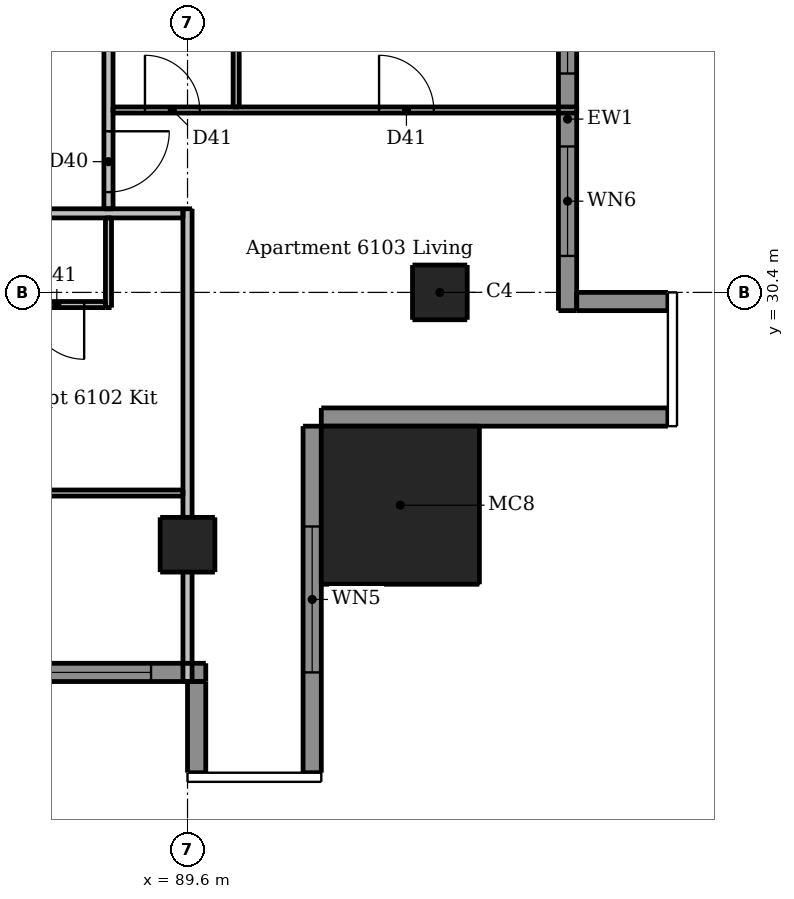
"""IFC4 building model, lengths in metres.
Left out: names, types, materials, properties, quantities, classifications, styles, units other than length and angle.
Written with IfcOpenShell. Run it as: python <this file> out.ifc"""

import sys

from ifc_helpers import new_model, si_unit, direction, frame, frame_2d, origin, origin_2d, place, context, subcontext, project, spatial, rectangle, extrude, element, fill, save


model = new_model("IFC4")
c1 = context("Model", 3, precision=1e-05, world=origin(), true_north=direction((0.0, 1.0)))
c2 = subcontext(c1, "Body", "Model", "MODEL_VIEW")
j1 = project(units=[si_unit("LENGTHUNIT", "METRE"), si_unit("PLANEANGLEUNIT", "RADIAN")], contexts=[c1])
p1 = place(None, origin())
s1 = spatial("IfcSite", under=j1, at=p1, CompositionType="ELEMENT")
p2 = place(p1, origin())
s2 = spatial("IfcBuilding", under=s1, at=p2, CompositionType="ELEMENT")
p3 = place(p2, frame((0.0, 0.0, 226.6)))
s3 = spatial("IfcBuildingStorey", under=s2, at=p3, CompositionType="ELEMENT", Elevation=226.6)
for number, where, z_axis, x_axis in (
    (1, (89.6, 26.25, 0.0), (0.0, 0.0, 1.0), (1.0, 0.0, 0.0)),
    (2, (93.75, 30.4, 0.0), (0.0, 0.0, 1.0), (1.0, 0.0, 0.0)),
):
    element("IfcColumn", number, at=place(p3, frame(where, z_axis=z_axis, x_axis=x_axis)), inside=s3, PredefinedType="COLUMN", context=c2, shape_type="SweptSolid", body=[
        extrude(rectangle(XDim=0.9, YDim=0.9, at=origin_2d()), origin(), (0.0, 0.0, 1.0), 2.95),
    ])
p4 = place(p3, frame((93.1, 26.9, 0.0), z_axis=(0.0, 0.0, 1.0), x_axis=(1.0, 0.0, 0.0)))
e3 = element("IfcColumn", 3, at=p4, inside=s3, PredefinedType="COLUMN", context=c2, shape_type="SweptSolid", body=[
    extrude(rectangle(XDim=2.6, YDim=2.6, at=origin_2d()), origin(), (0.0, 0.0, 1.0), 3.3),
])
p5 = place(p3, frame((89.75, 24.0, 0.0), z_axis=(0.0, 0.0, 1.0), x_axis=(0.0, -1.0, 0.0)))
e4 = element("IfcWall", 4, at=p5, inside=s3, PredefinedType="SOLIDWALL", context=c2, shape_type="SweptSolid", body=[
    extrude(rectangle(XDim=1.5, YDim=0.3, at=frame_2d((0.75, 0.0))), origin(), (0.0, 0.0, 1.0), 2.95),
])
p6 = place(p3, frame((91.65, 22.5, 0.0), z_axis=(0.0, 0.0, 1.0), x_axis=(0.0, 1.0, 0.0)))
e5 = element("IfcWall", 5, at=p6, inside=s3, PredefinedType="SOLIDWALL", context=c2, shape_type="SweptSolid", body=[
    extrude(rectangle(XDim=5.7, YDim=0.3, at=frame_2d((2.85, 0.0))), origin(), (0.0, 0.0, 1.0), 2.95),
])
p7 = place(p6, frame((1.65, 0.0, 0.15)))
e6 = element("IfcOpeningElement", 6, at=p7, cuts=e5, PredefinedType="OPENING", context=c2, shape_type="SweptSolid", body=[
    extrude(rectangle(XDim=2.4, YDim=2.1, at=frame_2d((1.2, 1.05))), frame((0.0, 0.16, 0.0), z_axis=(0.0, -1.0, 0.0), x_axis=(1.0, 0.0, 0.0)), (0.0, 0.0, 1.0), 0.32),
])
p8 = place(p3, frame((91.8, 28.35, 0.0), z_axis=(0.0, 0.0, 1.0), x_axis=(1.0, 0.0, 0.0)))
e7 = element("IfcWall", 7, at=p8, inside=s3, PredefinedType="SOLIDWALL", context=c2, shape_type="SweptSolid", body=[
    extrude(rectangle(XDim=5.7, YDim=0.3, at=frame_2d((2.85, 0.0))), origin(), (0.0, 0.0, 1.0), 2.95),
])
p9 = place(p3, frame((97.5, 30.25, 0.0), z_axis=(0.0, 0.0, 1.0), x_axis=(-1.0, 0.0, 0.0)))
e8 = element("IfcWall", 8, at=p9, inside=s3, PredefinedType="SOLIDWALL", context=c2, shape_type="SweptSolid", body=[
    extrude(rectangle(XDim=1.5, YDim=0.3, at=frame_2d((0.75, 0.0))), origin(), (0.0, 0.0, 1.0), 2.95),
])
p10 = place(p3, frame((83.6, 24.15, 0.0), z_axis=(0.0, 0.0, 1.0), x_axis=(1.0, 0.0, 0.0)))
e9 = element("IfcWall", 9, at=p10, inside=s3, PredefinedType="SOLIDWALL", context=c2, shape_type="SweptSolid", body=[
    extrude(rectangle(XDim=6.3, YDim=0.3, at=frame_2d((3.15, 0.0))), origin(), (0.0, 0.0, 1.0), 2.34),
])
p11 = place(p10, frame((0.6, 0.0, 0.15)))
e10 = element("IfcOpeningElement", 10, at=p11, cuts=e9, PredefinedType="OPENING", context=c2, shape_type="SweptSolid", body=[
    extrude(rectangle(XDim=1.8, YDim=2.1, at=frame_2d((0.9, 1.05))), frame((0.0, 0.16, 0.0), z_axis=(0.0, -1.0, 0.0), x_axis=(1.0, 0.0, 0.0)), (0.0, 0.0, 1.0), 0.32),
])
p12 = place(p10, frame((3.6, 0.0, 0.15)))
e11 = element("IfcOpeningElement", 11, at=p12, cuts=e9, PredefinedType="OPENING", context=c2, shape_type="SweptSolid", body=[
    extrude(rectangle(XDim=1.8, YDim=2.1, at=frame_2d((0.9, 1.05))), frame((0.0, 0.16, 0.0), z_axis=(0.0, -1.0, 0.0), x_axis=(1.0, 0.0, 0.0)), (0.0, 0.0, 1.0), 0.32),
])
p13 = place(p3, frame((95.85, 30.1, 0.0), z_axis=(0.0, 0.0, 1.0), x_axis=(0.0, 1.0, 0.0)))
e12 = element("IfcWall", 12, at=p13, inside=s3, PredefinedType="SOLIDWALL", context=c2, shape_type="SweptSolid", body=[
    extrude(rectangle(XDim=6.3, YDim=0.3, at=frame_2d((3.15, 0.0))), origin(), (0.0, 0.0, 1.0), 2.34),
])
p14 = place(p13, frame((0.9, 0.0, 0.15)))
e13 = element("IfcOpeningElement", 13, at=p14, cuts=e12, PredefinedType="OPENING", context=c2, shape_type="SweptSolid", body=[
    extrude(rectangle(XDim=1.8, YDim=2.1, at=frame_2d((0.9, 1.05))), frame((0.0, 0.16, 0.0), z_axis=(0.0, -1.0, 0.0), x_axis=(1.0, 0.0, 0.0)), (0.0, 0.0, 1.0), 0.32),
])
p15 = place(p13, frame((3.9, 0.0, 0.15)))
e14 = element("IfcOpeningElement", 14, at=p15, cuts=e12, PredefinedType="OPENING", context=c2, shape_type="SweptSolid", body=[
    extrude(rectangle(XDim=1.8, YDim=2.1, at=frame_2d((0.9, 1.05))), frame((0.0, 0.16, 0.0), z_axis=(0.0, -1.0, 0.0), x_axis=(1.0, 0.0, 0.0)), (0.0, 0.0, 1.0), 0.32),
])
p16 = place(p3, frame((88.3, 30.15, 0.0), z_axis=(0.0, 0.0, 1.0), x_axis=(0.0, 1.0, 0.0)))
e15 = element("IfcWall", 15, at=p16, inside=s3, PredefinedType="PARTITIONING", context=c2, shape_type="SweptSolid", body=[
    extrude(rectangle(XDim=1.475, YDim=0.1, at=frame_2d((0.738, 0.0))), origin(), (0.0, 0.0, 1.0), 2.95),
])
p17 = place(p3, frame((90.4, 33.45, 0.0), z_axis=(0.0, 0.0, 1.0), x_axis=(0.0, 1.0, 0.0)))
e16 = element("IfcWall", 16, at=p17, inside=s3, PredefinedType="PARTITIONING", context=c2, shape_type="SweptSolid", body=[
    extrude(rectangle(XDim=5.875, YDim=0.1, at=frame_2d((2.938, 0.0))), origin(), (0.0, 0.0, 1.0), 2.95),
])
p18 = place(p17, frame((3.75, 0.0, 0.0)))
e17 = element("IfcOpeningElement", 17, at=p18, cuts=e16, PredefinedType="OPENING", context=c2, shape_type="SweptSolid", body=[
    extrude(rectangle(XDim=0.8, YDim=2.1, at=frame_2d((0.4, 1.05))), frame((0.0, 0.06, 0.0), z_axis=(0.0, -1.0, 0.0), x_axis=(1.0, 0.0, 0.0)), (0.0, 0.0, 1.0), 0.12),
])
p19 = place(p3, frame((88.375, 33.4, 0.0), z_axis=(0.0, 0.0, 1.0), x_axis=(1.0, 0.0, 0.0)))
e18 = element("IfcWall", 18, at=p19, inside=s3, PredefinedType="PARTITIONING", context=c2, shape_type="SweptSolid", body=[
    extrude(rectangle(XDim=7.625, YDim=0.1, at=frame_2d((3.812, 0.0))), origin(), (0.0, 0.0, 1.0), 2.95),
])
p20 = place(p19, frame((0.525, 0.0, 0.0)))
e19 = element("IfcOpeningElement", 19, at=p20, cuts=e18, PredefinedType="OPENING", context=c2, shape_type="SweptSolid", body=[
    extrude(rectangle(XDim=0.9, YDim=2.1, at=frame_2d((0.45, 1.05))), frame((0.0, 0.06, 0.0), z_axis=(0.0, -1.0, 0.0), x_axis=(1.0, 0.0, 0.0)), (0.0, 0.0, 1.0), 0.12),
])
p21 = place(p19, frame((4.375, 0.0, 0.0)))
e20 = element("IfcOpeningElement", 20, at=p21, cuts=e18, PredefinedType="OPENING", context=c2, shape_type="SweptSolid", body=[
    extrude(rectangle(XDim=0.9, YDim=2.1, at=frame_2d((0.45, 1.05))), frame((0.0, 0.06, 0.0), z_axis=(0.0, -1.0, 0.0), x_axis=(1.0, 0.0, 0.0)), (0.0, 0.0, 1.0), 0.12),
])
p22 = place(p3, frame((88.25, 30.2, 0.0), z_axis=(0.0, 0.0, 1.0), x_axis=(-1.0, 0.0, 0.0)))
e21 = element("IfcWall", 21, at=p22, inside=s3, PredefinedType="PARTITIONING", context=c2, shape_type="SweptSolid", body=[
    extrude(rectangle(XDim=16.575, YDim=0.1, at=frame_2d((8.288, 0.0))), origin(), (0.0, 0.0, 1.0), 2.95),
])
p23 = place(p22, frame((5.7, 0.0, 0.0)))
e22 = element("IfcOpeningElement", 22, at=p23, cuts=e21, PredefinedType="OPENING", context=c2, shape_type="SweptSolid", body=[
    extrude(rectangle(XDim=0.9, YDim=2.1, at=frame_2d((0.45, 1.05))), frame((0.0, 0.06, 0.0), z_axis=(0.0, -1.0, 0.0), x_axis=(1.0, 0.0, 0.0)), (0.0, 0.0, 1.0), 0.12),
])
p24 = place(p22, frame((0.35, 0.0, 0.0)))
e23 = element("IfcOpeningElement", 23, at=p24, cuts=e21, PredefinedType="OPENING", context=c2, shape_type="SweptSolid", body=[
    extrude(rectangle(XDim=0.9, YDim=2.1, at=frame_2d((0.45, 1.05))), frame((0.0, 0.06, 0.0), z_axis=(0.0, -1.0, 0.0), x_axis=(1.0, 0.0, 0.0)), (0.0, 0.0, 1.0), 0.12),
])
p25 = place(p22, frame((2.1, 0.0, 0.0)))
e24 = element("IfcOpeningElement", 24, at=p25, cuts=e21, PredefinedType="OPENING", context=c2, shape_type="SweptSolid", body=[
    extrude(rectangle(XDim=0.9, YDim=2.1, at=frame_2d((0.45, 1.05))), frame((0.0, 0.06, 0.0), z_axis=(0.0, -1.0, 0.0), x_axis=(1.0, 0.0, 0.0)), (0.0, 0.0, 1.0), 0.12),
])
p26 = place(p22, frame((9.35, 0.0, 0.0)))
e25 = element("IfcOpeningElement", 25, at=p26, cuts=e21, PredefinedType="OPENING", context=c2, shape_type="SweptSolid", body=[
    extrude(rectangle(XDim=0.8, YDim=2.1, at=frame_2d((0.4, 1.05))), frame((0.0, 0.06, 0.0), z_axis=(0.0, -1.0, 0.0), x_axis=(1.0, 0.0, 0.0)), (0.0, 0.0, 1.0), 0.12),
])
p27 = place(p22, frame((14.4, 0.0, 0.0)))
e26 = element("IfcOpeningElement", 26, at=p27, cuts=e21, PredefinedType="OPENING", context=c2, shape_type="SweptSolid", body=[
    extrude(rectangle(XDim=0.9, YDim=2.1, at=frame_2d((0.45, 1.05))), frame((0.0, 0.06, 0.0), z_axis=(0.0, -1.0, 0.0), x_axis=(1.0, 0.0, 0.0)), (0.0, 0.0, 1.0), 0.12),
])
p28 = place(p22, frame((11.45, 0.0, 0.0)))
e27 = element("IfcOpeningElement", 27, at=p28, cuts=e21, PredefinedType="OPENING", context=c2, shape_type="SweptSolid", body=[
    extrude(rectangle(XDim=0.8, YDim=2.1, at=frame_2d((0.4, 1.05))), frame((0.0, 0.06, 0.0), z_axis=(0.0, -1.0, 0.0), x_axis=(1.0, 0.0, 0.0)), (0.0, 0.0, 1.0), 0.12),
])
p29 = place(p3, frame((84.85, 27.1, 0.0), z_axis=(0.0, 0.0, 1.0), x_axis=(1.0, 0.0, 0.0)))
e28 = element("IfcWall", 28, at=p29, inside=s3, PredefinedType="PARTITIONING", context=c2, shape_type="SweptSolid", body=[
    extrude(rectangle(XDim=4.675, YDim=0.1, at=frame_2d((2.337, 0.0))), origin(), (0.0, 0.0, 1.0), 2.95),
])
p30 = place(p3, frame((88.3, 61.175, 0.0), z_axis=(0.0, 0.0, 1.0), x_axis=(0.0, -1.0, 0.0)))
e29 = element("IfcWall", 29, at=p30, inside=s3, PredefinedType="PARTITIONING", context=c2, shape_type="SweptSolid", body=[
    extrude(rectangle(XDim=29.4, YDim=0.15, at=frame_2d((14.7, 0.0))), origin(), (0.0, 0.0, 1.0), 2.95),
])
p31 = place(p30, frame((28.125, 0.0, 0.0)))
e30 = element("IfcOpeningElement", 30, at=p31, cuts=e29, PredefinedType="OPENING", context=c2, shape_type="SweptSolid", body=[
    extrude(rectangle(XDim=1.0, YDim=2.1, at=frame_2d((0.5, 1.05))), frame((0.0, 0.085, 0.0), z_axis=(0.0, -1.0, 0.0), x_axis=(1.0, 0.0, 0.0)), (0.0, 0.0, 1.0), 0.17),
])
p32 = place(p30, frame((10.775, 0.0, 0.0)))
e31 = element("IfcOpeningElement", 31, at=p32, cuts=e29, PredefinedType="OPENING", context=c2, shape_type="SweptSolid", body=[
    extrude(rectangle(XDim=1.0, YDim=2.1, at=frame_2d((0.5, 1.05))), frame((0.0, 0.085, 0.0), z_axis=(0.0, -1.0, 0.0), x_axis=(1.0, 0.0, 0.0)), (0.0, 0.0, 1.0), 0.17),
])
p33 = place(p3, frame((89.6, 24.0, 0.0), z_axis=(0.0, 0.0, 1.0), x_axis=(0.0, 1.0, 0.0)))
e32 = element("IfcWall", 32, at=p33, inside=s3, PredefinedType="PARTITIONING", context=c2, shape_type="SweptSolid", body=[
    extrude(rectangle(XDim=7.775, YDim=0.15, at=frame_2d((3.887, 0.0))), origin(), (0.0, 0.0, 1.0), 2.332),
])
p34 = place(p3, frame((89.525, 31.7, 0.0), z_axis=(0.0, 0.0, 1.0), x_axis=(-1.0, 0.0, 0.0)))
e33 = element("IfcWall", 33, at=p34, inside=s3, PredefinedType="PARTITIONING", context=c2, shape_type="SweptSolid", body=[
    extrude(rectangle(XDim=30.55, YDim=0.15, at=frame_2d((15.275, 0.0))), origin(), (0.0, 0.0, 1.0), 2.95),
])
p35 = place(p34, frame((26.775, 0.0, 0.0)))
e34 = element("IfcOpeningElement", 34, at=p35, cuts=e33, PredefinedType="OPENING", context=c2, shape_type="SweptSolid", body=[
    extrude(rectangle(XDim=1.0, YDim=2.1, at=frame_2d((0.5, 1.05))), frame((0.0, 0.085, 0.0), z_axis=(0.0, -1.0, 0.0), x_axis=(1.0, 0.0, 0.0)), (0.0, 0.0, 1.0), 0.17),
])
p36 = place(p34, frame((9.075, 0.0, 0.0)))
e35 = element("IfcOpeningElement", 35, at=p36, cuts=e33, PredefinedType="OPENING", context=c2, shape_type="SweptSolid", body=[
    extrude(rectangle(XDim=1.0, YDim=2.1, at=frame_2d((0.5, 1.05))), frame((0.0, 0.085, 0.0), z_axis=(0.0, -1.0, 0.0), x_axis=(1.0, 0.0, 0.0)), (0.0, 0.0, 1.0), 0.17),
])
p37 = place(p7, origin())
e36 = element("IfcWindow", 36, at=p37, inside=s3, PartitioningType="DOUBLE_PANEL_VERTICAL", PredefinedType="WINDOW", context=c2, shape_type="SweptSolid", body=[
    extrude(rectangle(XDim=2.4, YDim=2.1, at=frame_2d((1.2, 1.05))), frame((0.0, 0.03, 0.0), z_axis=(0.0, -1.0, 0.0), x_axis=(1.0, 0.0, 0.0)), (0.0, 0.0, 1.0), 0.06),
])
fill(e6, e36)
p38 = place(p12, origin())
e37 = element("IfcWindow", 37, at=p38, inside=s3, PartitioningType="DOUBLE_PANEL_VERTICAL", PredefinedType="WINDOW", context=c2, shape_type="SweptSolid", body=[
    extrude(rectangle(XDim=1.8, YDim=2.1, at=frame_2d((0.9, 1.05))), frame((0.0, 0.03, 0.0), z_axis=(0.0, -1.0, 0.0), x_axis=(1.0, 0.0, 0.0)), (0.0, 0.0, 1.0), 0.06),
])
fill(e11, e37)
p39 = place(p14, origin())
e38 = element("IfcWindow", 38, at=p39, inside=s3, PartitioningType="DOUBLE_PANEL_VERTICAL", PredefinedType="WINDOW", context=c2, shape_type="SweptSolid", body=[
    extrude(rectangle(XDim=1.8, YDim=2.1, at=frame_2d((0.9, 1.05))), frame((0.0, 0.03, 0.0), z_axis=(0.0, -1.0, 0.0), x_axis=(1.0, 0.0, 0.0)), (0.0, 0.0, 1.0), 0.06),
])
fill(e13, e38)
p40 = place(p15, origin())
e39 = element("IfcWindow", 39, at=p40, inside=s3, PartitioningType="DOUBLE_PANEL_VERTICAL", PredefinedType="WINDOW", context=c2, shape_type="SweptSolid", body=[
    extrude(rectangle(XDim=1.8, YDim=2.1, at=frame_2d((0.9, 1.05))), frame((0.0, 0.03, 0.0), z_axis=(0.0, -1.0, 0.0), x_axis=(1.0, 0.0, 0.0)), (0.0, 0.0, 1.0), 0.06),
])
fill(e14, e39)
p41 = place(p24, origin())
e40 = element("IfcDoor", 40, at=p41, inside=s3, OperationType="SINGLE_SWING_LEFT", PredefinedType="DOOR", context=c2, shape_type="SweptSolid", body=[
    extrude(rectangle(XDim=0.9, YDim=2.1, at=frame_2d((0.45, 1.05))), frame((0.0, 0.025, 0.0), z_axis=(0.0, -1.0, 0.0), x_axis=(1.0, 0.0, 0.0)), (0.0, 0.0, 1.0), 0.05),
])
fill(e23, e40)
p42 = place(p31, origin())
e41 = element("IfcDoor", 41, at=p42, inside=s3, OperationType="SINGLE_SWING_LEFT", PredefinedType="DOOR", context=c2, shape_type="SweptSolid", body=[
    extrude(rectangle(XDim=1.0, YDim=2.1, at=frame_2d((0.5, 1.05))), frame((0.0, 0.025, 0.0), z_axis=(0.0, -1.0, 0.0), x_axis=(1.0, 0.0, 0.0)), (0.0, 0.0, 1.0), 0.05),
])
fill(e30, e41)
p43 = place(p20, origin())
e42 = element("IfcDoor", 42, at=p43, inside=s3, OperationType="SINGLE_SWING_LEFT", PredefinedType="DOOR", context=c2, shape_type="SweptSolid", body=[
    extrude(rectangle(XDim=0.9, YDim=2.1, at=frame_2d((0.45, 1.05))), frame((0.0, 0.025, 0.0), z_axis=(0.0, -1.0, 0.0), x_axis=(1.0, 0.0, 0.0)), (0.0, 0.0, 1.0), 0.05),
])
fill(e19, e42)
p44 = place(p21, origin())
e43 = element("IfcDoor", 43, at=p44, inside=s3, OperationType="SINGLE_SWING_LEFT", PredefinedType="DOOR", context=c2, shape_type="SweptSolid", body=[
    extrude(rectangle(XDim=0.9, YDim=2.1, at=frame_2d((0.45, 1.05))), frame((0.0, 0.025, 0.0), z_axis=(0.0, -1.0, 0.0), x_axis=(1.0, 0.0, 0.0)), (0.0, 0.0, 1.0), 0.05),
])
fill(e20, e43)
save(model, sys.argv[1])
